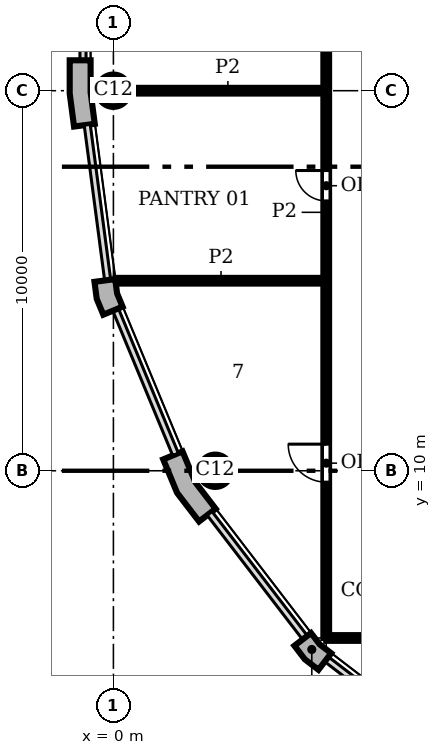
"""IFC4 building model, lengths in metres.
Left out: names, types, materials, properties, quantities, classifications, styles, units other than length and angle.
Written with IfcOpenShell. Run it as: python <this file> out.ifc"""

import sys

from ifc_helpers import new_model, si_unit, direction, frame, frame_2d, origin, origin_2d, place, context, subcontext, project, spatial, polyline, rectangle, circle, outline, extrude, element, fill, save


model = new_model("IFC4")
c1 = context("Model", 3, precision=1e-05, world=origin(), true_north=direction((0.0, 1.0)))
c2 = subcontext(c1, "Body", "Model", "MODEL_VIEW")
j1 = project(units=[si_unit("LENGTHUNIT", "METRE"), si_unit("PLANEANGLEUNIT", "RADIAN")], contexts=[c1])
p1 = place(None, origin())
s1 = spatial("IfcSite", under=j1, at=p1, CompositionType="ELEMENT")
p2 = place(p1, origin())
s2 = spatial("IfcBuilding", under=s1, at=p2, CompositionType="ELEMENT")
p3 = place(p2, frame((0.0, 0.0, 358.2)))
s3 = spatial("IfcBuildingStorey", under=s2, at=p3, CompositionType="ELEMENT", Elevation=358.2)
for number, where, z_axis, x_axis in (
    (1, (0.0, 20.0, 0.0), (0.0, 0.0, 1.0), (1.0, 0.0, 0.0)),
    (2, (2.679, 10.0, 0.0), (0.0, 0.0, 1.0), (1.0, 0.0, 0.0)),
):
    element("IfcColumn", number, at=place(p3, frame(where, z_axis=z_axis, x_axis=x_axis)), inside=s3, PredefinedType="COLUMN", context=c2, shape_type="SweptSolid", body=[
        extrude(circle(Radius=0.425, at=origin_2d()), origin(), (0.0, 0.0, 1.0), 7.2),
    ])
p4 = place(p3, origin())
e3 = element("IfcWall", 3, at=p4, inside=s3, PredefinedType="SOLIDWALL", context=c2, shape_type="SweptSolid", body=[
    extrude(outline(polyline([(-1.0, 20.8), (-1.15, 20.8), (-1.15, 19.925), (-1.036, 19.057), (-0.887, 19.076), (-0.49, 19.128), (-0.6, 19.961), (-0.6, 20.8), (-1.0, 20.8)])), origin(), (0.0, 0.0, 1.0), 7.2),
])
e4 = element("IfcWall", 4, at=p4, inside=s3, PredefinedType="SOLIDWALL", context=c2, shape_type="SweptSolid", body=[
    extrude(outline(polyline([(-0.349, 14.99), (-0.498, 14.971), (-0.439, 14.523), (-0.266, 14.106), (-0.128, 14.164), (0.242, 14.317), (0.097, 14.667), (0.047, 15.043), (-0.349, 14.99)])), origin(), (0.0, 0.0, 1.0), 7.2),
])
e5 = element("IfcWall", 5, at=p4, inside=s3, PredefinedType="SOLIDWALL", context=c2, shape_type="SweptSolid", body=[
    extrude(outline(polyline([(1.449, 10.356), (1.311, 10.299), (1.675, 9.42), (2.254, 8.665), (2.373, 8.757), (2.69, 9.0), (2.155, 9.698), (1.819, 10.51), (1.449, 10.356)])), origin(), (0.0, 0.0, 1.0), 7.2),
])
e6 = element("IfcWall", 6, at=p4, inside=s3, PredefinedType="SOLIDWALL", context=c2, shape_type="SweptSolid", body=[
    extrude(outline(polyline([(4.882, 5.487), (4.763, 5.396), (5.038, 5.038), (5.396, 4.763), (5.487, 4.882), (5.731, 5.199), (5.43, 5.43), (5.199, 5.731), (4.882, 5.487)])), origin(), (0.0, 0.0, 1.0), 7.2),
])
p5 = place(p3, frame((5.6, 5.6, 0.0), z_axis=(0.0, 0.0, 1.0), x_axis=(0.0, 1.0, 0.0)))
e7 = element("IfcWall", 7, at=p5, inside=s3, PredefinedType="PARTITIONING", context=c2, shape_type="SweptSolid", body=[
    extrude(rectangle(XDim=22.4, YDim=0.15, at=frame_2d((11.2, 0.0))), origin(), (0.0, 0.0, 1.0), 6.75),
])
p6 = place(p5, frame((4.1, 0.0, 0.0)))
e8 = element("IfcOpeningElement", 8, at=p6, cuts=e7, PredefinedType="OPENING", context=c2, shape_type="SweptSolid", body=[
    extrude(rectangle(XDim=1.0, YDim=2.1, at=frame_2d((0.5, 1.05))), frame((0.0, 0.085, 0.0), z_axis=(0.0, -1.0, 0.0), x_axis=(1.0, 0.0, 0.0)), (0.0, 0.0, 1.0), 0.17),
])
p7 = place(p5, frame((11.5, 0.0, 0.0)))
e9 = element("IfcOpeningElement", 9, at=p7, cuts=e7, PredefinedType="OPENING", context=c2, shape_type="SweptSolid", body=[
    extrude(rectangle(XDim=0.8, YDim=2.1, at=frame_2d((0.4, 1.05))), frame((0.0, 0.085, 0.0), z_axis=(0.0, -1.0, 0.0), x_axis=(1.0, 0.0, 0.0)), (0.0, 0.0, 1.0), 0.17),
])
p8 = place(p3, frame((5.6, 5.6, 0.0), z_axis=(0.0, 0.0, 1.0), x_axis=(1.0, 0.0, 0.0)))
e10 = element("IfcWall", 10, at=p8, inside=s3, PredefinedType="PARTITIONING", context=c2, shape_type="SweptSolid", body=[
    extrude(rectangle(XDim=25.4, YDim=0.15, at=frame_2d((12.7, 0.0))), origin(), (0.0, 0.0, 1.0), 6.75),
])
p9 = place(p8, frame((11.35, 0.0, 0.0)))
e11 = element("IfcOpeningElement", 11, at=p9, cuts=e10, PredefinedType="OPENING", context=c2, shape_type="SweptSolid", body=[
    extrude(rectangle(XDim=1.8, YDim=2.1, at=frame_2d((0.9, 1.05))), frame((0.0, 0.085, 0.0), z_axis=(0.0, -1.0, 0.0), x_axis=(1.0, 0.0, 0.0)), (0.0, 0.0, 1.0), 0.17),
])
p10 = place(p3, frame((0.063, 15.0, 0.0), z_axis=(0.0, 0.0, 1.0), x_axis=(1.0, 0.0, 0.0)))
e12 = element("IfcWall", 12, at=p10, inside=s3, PredefinedType="PARTITIONING", context=c2, shape_type="SweptSolid", body=[
    extrude(rectangle(XDim=5.537, YDim=0.15, at=frame_2d((2.769, 0.0))), origin(), (0.0, 0.0, 1.0), 6.75),
])
p11 = place(p3, frame((0.425, 20.0, 0.0), z_axis=(0.0, 0.0, 1.0), x_axis=(1.0, 0.0, 0.0)))
e13 = element("IfcWall", 13, at=p11, inside=s3, PredefinedType="PARTITIONING", context=c2, shape_type="SweptSolid", body=[
    extrude(rectangle(XDim=5.175, YDim=0.15, at=frame_2d((2.587, 0.0))), origin(), (0.0, 0.0, 1.0), 6.75),
])
p12 = place(p6, origin())
e14 = element("IfcDoor", 14, at=p12, inside=s3, OperationType="SINGLE_SWING_RIGHT", PredefinedType="DOOR", context=c2, shape_type="SweptSolid", body=[
    extrude(rectangle(XDim=1.0, YDim=2.1, at=frame_2d((0.5, 1.05))), frame((0.0, 0.025, 0.0), z_axis=(0.0, -1.0, 0.0), x_axis=(1.0, 0.0, 0.0)), (0.0, 0.0, 1.0), 0.05),
])
fill(e8, e14)
p13 = place(p7, origin())
e15 = element("IfcDoor", 15, at=p13, inside=s3, OperationType="SINGLE_SWING_RIGHT", PredefinedType="DOOR", context=c2, shape_type="SweptSolid", body=[
    extrude(rectangle(XDim=0.8, YDim=2.1, at=frame_2d((0.4, 1.05))), frame((0.0, 0.025, 0.0), z_axis=(0.0, -1.0, 0.0), x_axis=(1.0, 0.0, 0.0)), (0.0, 0.0, 1.0), 0.05),
])
fill(e9, e15)
save(model, sys.argv[1])
